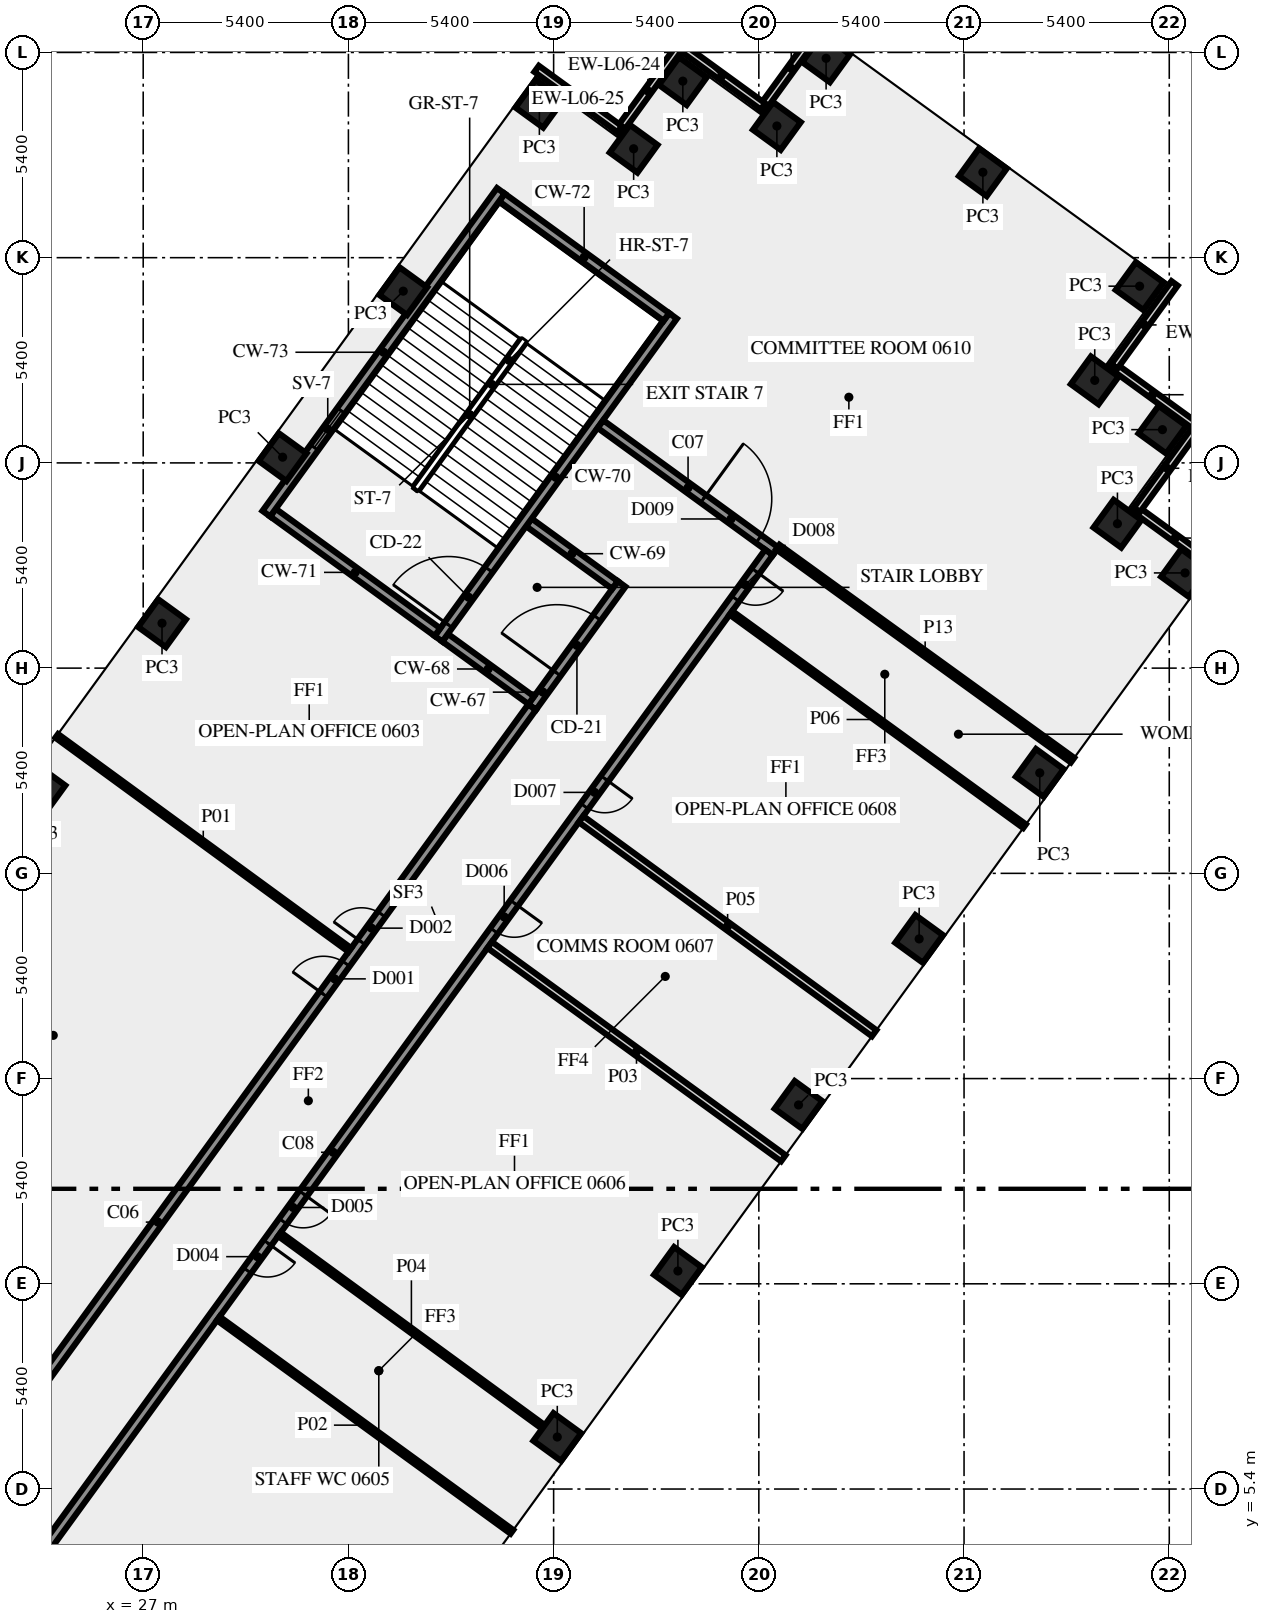
"""IFC4 building model, lengths in metres.
Left out: names, types, materials, properties, quantities, classifications, styles, units other than length and angle.
Written with IfcOpenShell. Run it as: python <this file> out.ifc"""

import sys

from ifc_helpers import new_model, si_unit, direction, frame, frame_2d, origin, origin_2d, place, context, subcontext, project, spatial, rectangle, extrude, element, fill, save


model = new_model("IFC4")
c1 = context("Model", 3, precision=1e-05, world=origin(), true_north=direction((0.0, 1.0)))
c2 = subcontext(c1, "Body", "Model", "MODEL_VIEW")
j1 = project(units=[si_unit("LENGTHUNIT", "METRE"), si_unit("PLANEANGLEUNIT", "RADIAN")], contexts=[c1])
p1 = place(None, origin())
s1 = spatial("IfcSite", under=j1, at=p1, CompositionType="ELEMENT")
p2 = place(p1, origin())
s2 = spatial("IfcBuilding", under=s1, at=p2, CompositionType="ELEMENT")
p3 = place(p2, frame((0.0, 0.0, 31.0)))
s3 = spatial("IfcBuildingStorey", under=s2, at=p3, CompositionType="ELEMENT", Elevation=31.0)
for number, where, z_axis, x_axis in (
    (1, (37.896, 6.769, 0.0), (0.0, 0.0, 1.0), (0.588, 0.809, 0.0)),
    (2, (41.07, 11.137, 0.0), (0.0, 0.0, 1.0), (0.588, 0.809, 0.0)),
    (3, (44.244, 15.506, 0.0), (0.0, 0.0, 1.0), (0.588, 0.809, 0.0)),
    (4, (47.418, 19.875, 0.0), (0.0, 0.0, 1.0), (0.588, 0.809, 0.0)),
    (5, (50.592, 24.243, 0.0), (0.0, 0.0, 1.0), (0.588, 0.809, 0.0)),
    (6, (54.415, 29.505, 0.0), (0.0, 0.0, 1.0), (0.588, 0.809, 0.0)),
    (7, (52.636, 30.8, 0.0), (0.0, 0.0, 1.0), (-0.809, 0.588, 0.0)),
    (8, (53.82, 33.275, 0.0), (0.0, 0.0, 1.0), (-0.809, 0.588, 0.0)),
    (9, (52.039, 34.571, 0.0), (0.0, 0.0, 1.0), (0.588, 0.809, 0.0)),
    (10, (53.22, 37.05, 0.0), (0.0, 0.0, 1.0), (-0.809, 0.588, 0.0)),
    (11, (49.096, 40.047, 0.0), (0.0, 0.0, 1.0), (-0.809, 0.588, 0.0)),
    (12, (44.97, 43.045, 0.0), (0.0, 0.0, 1.0), (-0.809, 0.588, 0.0)),
    (13, (43.675, 41.265, 0.0), (0.0, 0.0, 1.0), (-0.809, 0.588, 0.0)),
    (14, (41.2, 42.445, 0.0), (0.0, 0.0, 1.0), (-0.588, -0.809, 0.0)),
    (15, (39.906, 40.666, 0.0), (0.0, 0.0, 1.0), (-0.588, -0.809, 0.0)),
    (16, (37.425, 41.85, 0.0), (0.0, 0.0, 1.0), (-0.588, -0.809, 0.0)),
    (17, (33.843, 36.919, 0.0), (0.0, 0.0, 1.0), (-0.588, -0.809, 0.0)),
    (18, (30.669, 32.55, 0.0), (0.0, 0.0, 1.0), (-0.588, -0.809, 0.0)),
    (19, (27.495, 28.181, 0.0), (0.0, 0.0, 1.0), (-0.588, -0.809, 0.0)),
    (20, (24.321, 23.812, 0.0), (0.0, 0.0, 1.0), (-0.588, -0.809, 0.0)),
):
    element("IfcColumn", number, at=place(p3, frame(where, z_axis=z_axis, x_axis=x_axis)), inside=s3, PredefinedType="COLUMN", context=c2, shape_type="SweptSolid", body=[
        extrude(rectangle(XDim=0.9, YDim=0.9, at=origin_2d()), origin(), (0.0, 0.0, 1.0), 3.65),
    ])
p4 = place(p3, frame((55.247, 29.629, 0.0), z_axis=(0.0, 0.0, 1.0), x_axis=(-0.809033161865, 0.587762999008, 0.0)))
e21 = element("IfcWall", 21, at=p4, inside=s3, PredefinedType="SOLIDWALL", context=c2, shape_type="SweptSolid", body=[
    extrude(rectangle(XDim=2.7, YDim=0.2, at=frame_2d((1.35, 0.0))), origin(), (0.0, 0.0, 1.0), 3.65),
])
p5 = place(p3, frame((53.151, 31.167, 0.0), z_axis=(0.0, 0.0, 1.0), x_axis=(0.587779184282, 0.809021403008, 0.0)))
e22 = element("IfcWall", 22, at=p5, inside=s3, PredefinedType="SOLIDWALL", context=c2, shape_type="SweptSolid", body=[
    extrude(rectangle(XDim=2.7, YDim=0.2, at=frame_2d((1.35, 0.0))), origin(), (0.0, 0.0, 1.0), 3.65),
])
for number, where, z_axis, x_axis in (
    (23, (54.65, 33.4, 0.0), (0.0, 0.0, 1.0), (-0.809, 0.588, 0.0)),
    (24, (52.553, 34.938, 0.0), (0.0, 0.0, 1.0), (0.588, 0.809, 0.0)),
    (25, (44.846, 43.875, 0.0), (0.0, 0.0, 1.0), (-0.588, -0.809, 0.0)),
    (26, (43.308, 41.779, 0.0), (0.0, 0.0, 1.0), (-0.809, 0.588, 0.0)),
):
    element("IfcWall", number, at=place(p3, frame(where, z_axis=z_axis, x_axis=x_axis)), inside=s3, PredefinedType="SOLIDWALL", context=c2, shape_type="SweptSolid", body=[
        extrude(rectangle(XDim=2.7, YDim=0.2, at=frame_2d((1.35, 0.0))), origin(), (0.0, 0.0, 1.0), 3.65),
    ])
p6 = place(p3, frame((41.075, 43.278, 0.0), z_axis=(0.0, 0.0, 1.0), x_axis=(-0.587806000234, -0.809001919707, 0.0)))
e27 = element("IfcWall", 27, at=p6, inside=s3, PredefinedType="SOLIDWALL", context=c2, shape_type="SweptSolid", body=[
    extrude(rectangle(XDim=2.7, YDim=0.2, at=frame_2d((1.35, 0.0))), origin(), (0.0, 0.0, 1.0), 3.65),
])
p7 = place(p3, frame((39.537, 41.181, 0.0), z_axis=(0.0, 0.0, 1.0), x_axis=(-0.809033161865, 0.587762999008, 0.0)))
e28 = element("IfcWall", 28, at=p7, inside=s3, PredefinedType="SOLIDWALL", context=c2, shape_type="SweptSolid", body=[
    extrude(rectangle(XDim=2.7, YDim=0.2, at=frame_2d((1.35, 0.0))), origin(), (0.0, 0.0, 1.0), 3.65),
])
p8 = place(p3, frame((37.238, 25.98, 0.0), z_axis=(0.0, 0.0, 1.0), x_axis=(0.587772420479, 0.809026317077, 0.0)))
e29 = element("IfcWall", 29, at=p8, inside=s3, PredefinedType="SHEAR", context=c2, shape_type="SweptSolid", body=[
    extrude(rectangle(XDim=4.0, YDim=0.25, at=frame_2d((2.0, 0.0))), origin(), (0.0, 0.0, 1.0), 3.65),
])
p9 = place(p8, frame((1.1, 0.0, 0.0)))
e30 = element("IfcOpeningElement", 30, at=p9, cuts=e29, PredefinedType="OPENING", context=c2, shape_type="SweptSolid", body=[
    extrude(rectangle(XDim=1.8, YDim=2.1, at=frame_2d((0.9, 1.05))), frame((0.0, 0.135, 0.0), z_axis=(0.0, -1.0, 0.0), x_axis=(1.0, 0.0, 0.0)), (0.0, 0.0, 1.0), 0.27),
])
for number, where, z_axis, x_axis in (
    (31, (37.21, 26.154, 0.0), (0.0, 0.0, 1.0), (-0.809, 0.588, 0.0)),
    (32, (39.414, 29.188, 0.0), (0.0, 0.0, 1.0), (-0.809, 0.588, 0.0)),
):
    element("IfcWall", number, at=place(p3, frame(where, z_axis=z_axis, x_axis=x_axis)), inside=s3, PredefinedType="SHEAR", context=c2, shape_type="SweptSolid", body=[
        extrude(rectangle(XDim=2.8, YDim=0.25, at=frame_2d((1.4, 0.0))), origin(), (0.0, 0.0, 1.0), 3.65),
    ])
p10 = place(p3, frame((34.77, 27.772, 0.0), z_axis=(0.0, 0.0, 1.0), x_axis=(0.587795589702, 0.809009483706, 0.0)))
e33 = element("IfcWall", 33, at=p10, inside=s3, PredefinedType="SHEAR", context=c2, shape_type="SweptSolid", body=[
    extrude(rectangle(XDim=10.5, YDim=0.25, at=frame_2d((5.25, 0.0))), origin(), (0.0, 0.0, 1.0), 3.65),
])
p11 = place(p10, frame((0.45, 0.0, 0.0)))
e34 = element("IfcOpeningElement", 34, at=p11, cuts=e33, PredefinedType="OPENING", context=c2, shape_type="SweptSolid", body=[
    extrude(rectangle(XDim=1.8, YDim=2.1, at=frame_2d((0.9, 1.05))), frame((0.0, 0.135, 0.0), z_axis=(0.0, -1.0, 0.0), x_axis=(1.0, 0.0, 0.0)), (0.0, 0.0, 1.0), 0.27),
])
p12 = place(p3, frame((34.742, 27.947, 0.0), z_axis=(0.0, 0.0, 1.0), x_axis=(-0.8089984606, 0.587810760999, 0.0)))
e35 = element("IfcWall", 35, at=p12, inside=s3, PredefinedType="SHEAR", context=c2, shape_type="SweptSolid", body=[
    extrude(rectangle(XDim=5.35, YDim=0.25, at=frame_2d((2.675, 0.0))), origin(), (0.0, 0.0, 1.0), 3.65),
])
p13 = place(p3, frame((40.767, 36.24, 0.0), z_axis=(0.0, 0.0, 1.0), x_axis=(-0.809020161303, 0.587780893365, 0.0)))
e36 = element("IfcWall", 36, at=p13, inside=s3, PredefinedType="SHEAR", context=c2, shape_type="SweptSolid", body=[
    extrude(rectangle(XDim=5.35, YDim=0.25, at=frame_2d((2.675, 0.0))), origin(), (0.0, 0.0, 1.0), 3.65),
])
p14 = place(p3, frame((30.24, 31.064, 0.0), z_axis=(0.0, 0.0, 1.0), x_axis=(0.587795589702, 0.809009483706, 0.0)))
e37 = element("IfcWall", 37, at=p14, inside=s3, PredefinedType="SHEAR", context=c2, shape_type="SweptSolid", body=[
    extrude(rectangle(XDim=10.5, YDim=0.25, at=frame_2d((5.25, 0.0))), origin(), (0.0, 0.0, 1.0), 3.65),
])
p15 = place(p14, frame((2.15, 0.0, 1.0)))
e38 = element("IfcOpeningElement", 38, at=p15, cuts=e37, PredefinedType="OPENING", context=c2, shape_type="SweptSolid", body=[
    extrude(rectangle(XDim=1.2, YDim=1.2, at=frame_2d((0.6, 0.6))), frame((0.0, 0.135, 0.0), z_axis=(0.0, -1.0, 0.0), x_axis=(1.0, 0.0, 0.0)), (0.0, 0.0, 1.0), 0.27),
])
p16 = place(p3, frame((17.545, -1.125, 0.0), z_axis=(0.0, 0.0, 1.0), x_axis=(0.587786323093, 0.809016216391, 0.0)))
e39 = element("IfcWall", 39, at=p16, inside=s3, PredefinedType="SOLIDWALL", context=c2, shape_type="SweptSolid", body=[
    extrude(rectangle(XDim=33.493, YDim=0.25, at=frame_2d((16.747, 0.0))), origin(), (0.0, 0.0, 1.0), 3.65),
])
p17 = place(p16, frame((25.857, 0.0, 0.0)))
e40 = element("IfcOpeningElement", 40, at=p17, cuts=e39, PredefinedType="OPENING", context=c2, shape_type="SweptSolid", body=[
    extrude(rectangle(XDim=0.9, YDim=2.1, at=frame_2d((0.45, 1.05))), frame((0.0, 0.135, 0.0), z_axis=(0.0, -1.0, 0.0), x_axis=(1.0, 0.0, 0.0)), (0.0, 0.0, 1.0), 0.27),
])
p18 = place(p16, frame((24.157, 0.0, 0.0)))
e41 = element("IfcOpeningElement", 41, at=p18, cuts=e39, PredefinedType="OPENING", context=c2, shape_type="SweptSolid", body=[
    extrude(rectangle(XDim=1.0, YDim=2.1, at=frame_2d((0.5, 1.05))), frame((0.0, 0.135, 0.0), z_axis=(0.0, -1.0, 0.0), x_axis=(1.0, 0.0, 0.0)), (0.0, 0.0, 1.0), 0.27),
])
p19 = place(p3, frame((39.034, 33.42, 0.0), z_axis=(0.0, 0.0, 1.0), x_axis=(0.809023325802, -0.587776537732, 0.0)))
e42 = element("IfcWall", 42, at=p19, inside=s3, PredefinedType="SOLIDWALL", context=c2, shape_type="SweptSolid", body=[
    extrude(rectangle(XDim=5.695, YDim=0.25, at=frame_2d((2.848, 0.0))), origin(), (0.0, 0.0, 1.0), 3.65),
])
p20 = place(p19, frame((3.345, 0.0, 0.0)))
e43 = element("IfcOpeningElement", 43, at=p20, cuts=e42, PredefinedType="OPENING", context=c2, shape_type="SweptSolid", body=[
    extrude(rectangle(XDim=1.8, YDim=2.1, at=frame_2d((0.9, 1.05))), frame((0.0, 0.135, 0.0), z_axis=(0.0, -1.0, 0.0), x_axis=(1.0, 0.0, 0.0)), (0.0, 0.0, 1.0), 0.27),
])
p21 = place(p3, frame((43.467, 30.045, 0.0), z_axis=(0.0, 0.0, 1.0), x_axis=(-0.587784726077, -0.809017376692, 0.0)))
e44 = element("IfcWall", 44, at=p21, inside=s3, PredefinedType="SOLIDWALL", context=c2, shape_type="SweptSolid", body=[
    extrude(rectangle(XDim=39.02, YDim=0.25, at=frame_2d((19.51, 0.0))), origin(), (0.0, 0.0, 1.0), 3.65),
])
p22 = place(p21, frame((37.588, 0.0, 0.0)))
e45 = element("IfcOpeningElement", 45, at=p22, cuts=e44, PredefinedType="OPENING", context=c2, shape_type="SweptSolid", body=[
    extrude(rectangle(XDim=0.9, YDim=2.1, at=frame_2d((0.45, 1.05))), frame((0.0, 0.135, 0.0), z_axis=(0.0, -1.0, 0.0), x_axis=(1.0, 0.0, 0.0)), (0.0, 0.0, 1.0), 0.27),
])
p23 = place(p21, frame((20.855, 0.0, 0.0)))
e46 = element("IfcOpeningElement", 46, at=p23, cuts=e44, PredefinedType="OPENING", context=c2, shape_type="SweptSolid", body=[
    extrude(rectangle(XDim=0.9, YDim=2.1, at=frame_2d((0.45, 1.05))), frame((0.0, 0.135, 0.0), z_axis=(0.0, -1.0, 0.0), x_axis=(1.0, 0.0, 0.0)), (0.0, 0.0, 1.0), 0.27),
])
p24 = place(p21, frame((7.355, 0.0, 0.0)))
e47 = element("IfcOpeningElement", 47, at=p24, cuts=e44, PredefinedType="OPENING", context=c2, shape_type="SweptSolid", body=[
    extrude(rectangle(XDim=0.9, YDim=2.1, at=frame_2d((0.45, 1.05))), frame((0.0, 0.135, 0.0), z_axis=(0.0, -1.0, 0.0), x_axis=(1.0, 0.0, 0.0)), (0.0, 0.0, 1.0), 0.27),
])
p25 = place(p21, frame((11.404, 0.0, 0.0)))
e48 = element("IfcOpeningElement", 48, at=p25, cuts=e44, PredefinedType="OPENING", context=c2, shape_type="SweptSolid", body=[
    extrude(rectangle(XDim=0.9, YDim=2.1, at=frame_2d((0.45, 1.05))), frame((0.0, 0.135, 0.0), z_axis=(0.0, -1.0, 0.0), x_axis=(1.0, 0.0, 0.0)), (0.0, 0.0, 1.0), 0.27),
])
p26 = place(p21, frame((0.604, 0.0, 0.0)))
e49 = element("IfcOpeningElement", 49, at=p26, cuts=e44, PredefinedType="OPENING", context=c2, shape_type="SweptSolid", body=[
    extrude(rectangle(XDim=0.9, YDim=2.1, at=frame_2d((0.45, 1.05))), frame((0.0, 0.135, 0.0), z_axis=(0.0, -1.0, 0.0), x_axis=(1.0, 0.0, 0.0)), (0.0, 0.0, 1.0), 0.27),
])
p27 = place(p21, frame((22.455, 0.0, 0.0)))
e50 = element("IfcOpeningElement", 50, at=p27, cuts=e44, PredefinedType="OPENING", context=c2, shape_type="SweptSolid", body=[
    extrude(rectangle(XDim=0.9, YDim=2.1, at=frame_2d((0.45, 1.05))), frame((0.0, 0.135, 0.0), z_axis=(0.0, -1.0, 0.0), x_axis=(1.0, 0.0, 0.0)), (0.0, 0.0, 1.0), 0.27),
])
p28 = place(p3, frame((24.724, 25.217, 0.0), z_axis=(0.0, 0.0, 1.0), x_axis=(0.807606997933, -0.589721067023, 0.0)))
e51 = element("IfcWall", 51, at=p28, inside=s3, PredefinedType="PARTITIONING", context=c2, shape_type="SweptSolid", body=[
    extrude(rectangle(XDim=9.55, YDim=0.12, at=frame_2d((4.775, 0.0))), origin(), (0.0, 0.0, 1.0), 2.75),
])
p29 = place(p3, frame((36.702, 4.274, 0.0), z_axis=(0.0, 0.0, 1.0), x_axis=(-0.808998008689, 0.58781138296, 0.0)))
e52 = element("IfcWall", 52, at=p29, inside=s3, PredefinedType="PARTITIONING", context=c2, shape_type="SweptSolid", body=[
    extrude(rectangle(XDim=9.55, YDim=0.12, at=frame_2d((4.775, 0.0))), origin(), (0.0, 0.0, 1.0), 2.75),
])
p30 = place(p3, frame((43.844, 14.104, 0.0), z_axis=(0.0, 0.0, 1.0), x_axis=(-0.809102944047, 0.587666934526, 0.0)))
e53 = element("IfcWall", 53, at=p30, inside=s3, PredefinedType="SOLIDWALL", context=c2, shape_type="SweptSolid", body=[
    extrude(rectangle(XDim=9.55, YDim=0.2, at=frame_2d((4.775, 0.0))), origin(), (0.0, 0.0, 1.0), 2.75),
])
p31 = place(p3, frame((30.587, 12.104, 0.0), z_axis=(0.0, 0.0, 1.0), x_axis=(0.807590933527, -0.589743066161, 0.0)))
e54 = element("IfcWall", 54, at=p31, inside=s3, PredefinedType="PARTITIONING", context=c2, shape_type="SweptSolid", body=[
    extrude(rectangle(XDim=8.594, YDim=0.12, at=frame_2d((4.297, 0.0))), origin(), (0.0, 0.0, 1.0), 3.65),
])
p32 = place(p3, frame((38.522, 23.026, 0.0), z_axis=(0.0, 0.0, 1.0), x_axis=(0.807606997933, -0.589721067023, 0.0)))
e55 = element("IfcWall", 55, at=p32, inside=s3, PredefinedType="SOLIDWALL", context=c2, shape_type="SweptSolid", body=[
    extrude(rectangle(XDim=9.55, YDim=0.2, at=frame_2d((4.775, 0.0))), origin(), (0.0, 0.0, 1.0), 2.75),
])
p33 = place(p3, frame((50.192, 22.841, 0.0), z_axis=(0.0, 0.0, 1.0), x_axis=(-0.809033337127, 0.587762757767, 0.0)))
e56 = element("IfcWall", 56, at=p33, inside=s3, PredefinedType="PARTITIONING", context=c2, shape_type="SweptSolid", body=[
    extrude(rectangle(XDim=9.551, YDim=0.12, at=frame_2d((4.775, 0.0))), origin(), (0.0, 0.0, 1.0), 2.75),
])
p34 = place(p3, frame((43.698, 30.185, 0.0), z_axis=(0.0, 0.0, 1.0), x_axis=(0.810419489461, -0.58585002441, 0.0)))
e57 = element("IfcWall", 57, at=p34, inside=s3, PredefinedType="PARTITIONING", context=c2, shape_type="SweptSolid", body=[
    extrude(rectangle(XDim=9.57, YDim=0.15, at=frame_2d((4.785, 0.0))), origin(), (0.0, 0.0, 1.0), 2.75),
])
p35 = place(p9, origin())
e58 = element("IfcDoor", 58, at=p35, inside=s3, OperationType="DOUBLE_DOOR_SINGLE_SWING", PredefinedType="DOOR", context=c2, shape_type="SweptSolid", body=[
    extrude(rectangle(XDim=1.8, YDim=2.1, at=frame_2d((0.9, 1.05))), frame((0.0, 0.025, 0.0), z_axis=(0.0, -1.0, 0.0), x_axis=(1.0, 0.0, 0.0)), (0.0, 0.0, 1.0), 0.05),
])
fill(e30, e58)
p36 = place(p11, origin())
e59 = element("IfcDoor", 59, at=p36, inside=s3, OperationType="DOUBLE_DOOR_SINGLE_SWING", PredefinedType="DOOR", context=c2, shape_type="SweptSolid", body=[
    extrude(rectangle(XDim=1.8, YDim=2.1, at=frame_2d((0.9, 1.05))), frame((0.0, 0.025, 0.0), z_axis=(0.0, -1.0, 0.0), x_axis=(1.0, 0.0, 0.0)), (0.0, 0.0, 1.0), 0.05),
])
fill(e34, e59)
p37 = place(p15, origin())
e60 = element("IfcWindow", 60, at=p37, inside=s3, PartitioningType="SINGLE_PANEL", PredefinedType="WINDOW", context=c2, shape_type="SweptSolid", body=[
    extrude(rectangle(XDim=1.2, YDim=1.2, at=frame_2d((0.6, 0.6))), frame((0.0, 0.03, 0.0), z_axis=(0.0, -1.0, 0.0), x_axis=(1.0, 0.0, 0.0)), (0.0, 0.0, 1.0), 0.06),
])
fill(e38, e60)
p38 = place(p17, origin())
e61 = element("IfcDoor", 61, at=p38, inside=s3, OperationType="SINGLE_SWING_LEFT", PredefinedType="DOOR", context=c2, shape_type="SweptSolid", body=[
    extrude(rectangle(XDim=0.9, YDim=2.1, at=frame_2d((0.45, 1.05))), frame((0.0, 0.025, 0.0), z_axis=(0.0, -1.0, 0.0), x_axis=(1.0, 0.0, 0.0)), (0.0, 0.0, 1.0), 0.05),
])
fill(e40, e61)
p39 = place(p23, origin())
e62 = element("IfcDoor", 62, at=p39, inside=s3, OperationType="SINGLE_SWING_RIGHT", PredefinedType="DOOR", context=c2, shape_type="SweptSolid", body=[
    extrude(rectangle(XDim=0.9, YDim=2.1, at=frame_2d((0.45, 1.05))), frame((0.0, 0.025, 0.0), z_axis=(0.0, -1.0, 0.0), x_axis=(1.0, 0.0, 0.0)), (0.0, 0.0, 1.0), 0.05),
])
fill(e46, e62)
p40 = place(p24, origin())
e63 = element("IfcDoor", 63, at=p40, inside=s3, OperationType="SINGLE_SWING_RIGHT", PredefinedType="DOOR", context=c2, shape_type="SweptSolid", body=[
    extrude(rectangle(XDim=0.9, YDim=2.1, at=frame_2d((0.45, 1.05))), frame((0.0, 0.025, 0.0), z_axis=(0.0, -1.0, 0.0), x_axis=(1.0, 0.0, 0.0)), (0.0, 0.0, 1.0), 0.05),
])
fill(e47, e63)
p41 = place(p20, origin())
e64 = element("IfcDoor", 64, at=p41, inside=s3, OperationType="DOUBLE_DOOR_SINGLE_SWING", PredefinedType="DOOR", context=c2, shape_type="SweptSolid", body=[
    extrude(rectangle(XDim=1.8, YDim=2.1, at=frame_2d((0.9, 1.05))), frame((0.0, 0.025, 0.0), z_axis=(0.0, -1.0, 0.0), x_axis=(1.0, 0.0, 0.0)), (0.0, 0.0, 1.0), 0.05),
])
fill(e43, e64)
p42 = place(p25, origin())
e65 = element("IfcDoor", 65, at=p42, inside=s3, OperationType="SINGLE_SWING_RIGHT", PredefinedType="DOOR", context=c2, shape_type="SweptSolid", body=[
    extrude(rectangle(XDim=0.9, YDim=2.1, at=frame_2d((0.45, 1.05))), frame((0.0, 0.025, 0.0), z_axis=(0.0, -1.0, 0.0), x_axis=(1.0, 0.0, 0.0)), (0.0, 0.0, 1.0), 0.05),
])
fill(e48, e65)
p43 = place(p18, origin())
e66 = element("IfcDoor", 66, at=p43, inside=s3, OperationType="SINGLE_SWING_RIGHT", PredefinedType="DOOR", context=c2, shape_type="SweptSolid", body=[
    extrude(rectangle(XDim=1.0, YDim=2.1, at=frame_2d((0.5, 1.05))), frame((0.0, 0.025, 0.0), z_axis=(0.0, -1.0, 0.0), x_axis=(1.0, 0.0, 0.0)), (0.0, 0.0, 1.0), 0.05),
])
fill(e41, e66)
p44 = place(p26, origin())
e67 = element("IfcDoor", 67, at=p44, inside=s3, OperationType="SINGLE_SWING_RIGHT", PredefinedType="DOOR", context=c2, shape_type="SweptSolid", body=[
    extrude(rectangle(XDim=0.9, YDim=2.1, at=frame_2d((0.45, 1.05))), frame((0.0, 0.025, 0.0), z_axis=(0.0, -1.0, 0.0), x_axis=(1.0, 0.0, 0.0)), (0.0, 0.0, 1.0), 0.05),
])
fill(e49, e67)
p45 = place(p27, origin())
e68 = element("IfcDoor", 68, at=p45, inside=s3, OperationType="SINGLE_SWING_LEFT", PredefinedType="DOOR", context=c2, shape_type="SweptSolid", body=[
    extrude(rectangle(XDim=0.9, YDim=2.1, at=frame_2d((0.45, 1.05))), frame((0.0, 0.025, 0.0), z_axis=(0.0, -1.0, 0.0), x_axis=(1.0, 0.0, 0.0)), (0.0, 0.0, 1.0), 0.05),
])
fill(e50, e68)
save(model, sys.argv[1])
